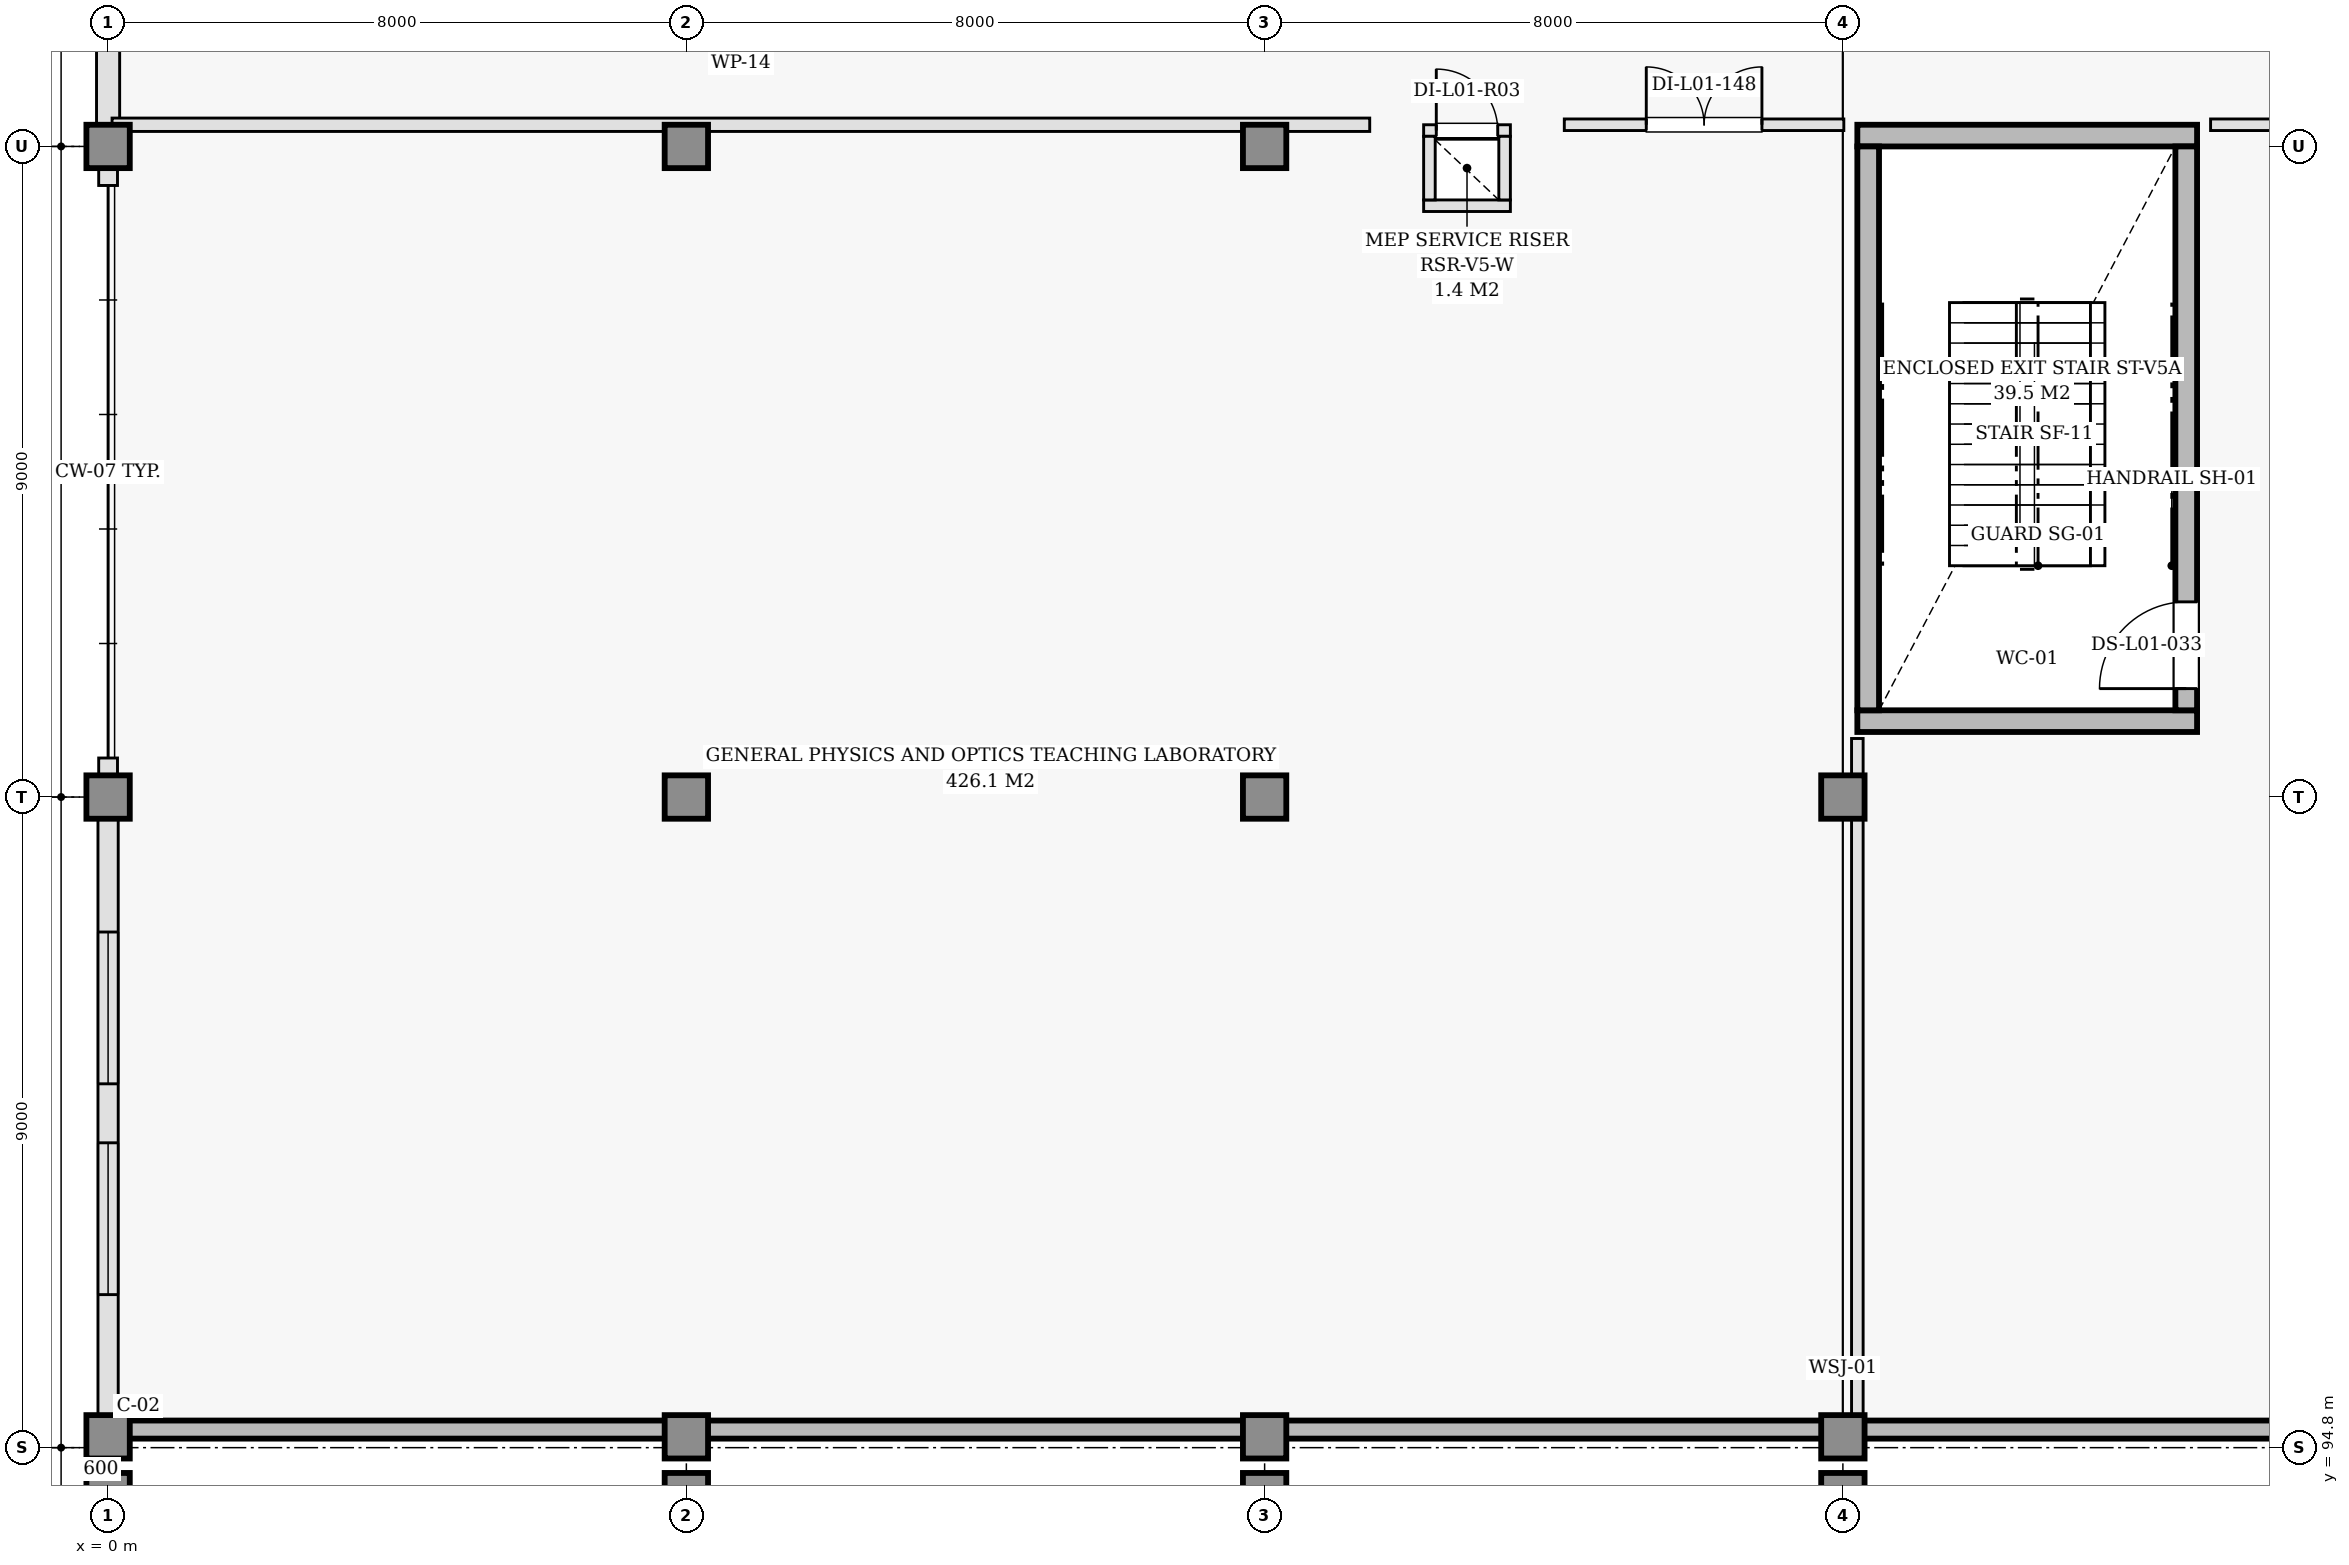
"""IFC4 building model, lengths in metres.
Left out: names, types, materials, properties, quantities, classifications, styles, units other than length and angle.
Written with IfcOpenShell. Run it as: python <this file> out.ifc"""

import sys

from ifc_helpers import new_model, si_unit, direction, frame, frame_2d, origin, origin_2d, place, context, subcontext, project, spatial, rectangle, extrude, element, fill, save


model = new_model("IFC4")
c1 = context("Model", 3, precision=1e-05, world=origin(), true_north=direction((0.0, 1.0)))
c2 = subcontext(c1, "Body", "Model", "MODEL_VIEW")
j1 = project(units=[si_unit("LENGTHUNIT", "METRE"), si_unit("PLANEANGLEUNIT", "RADIAN")], contexts=[c1])
p1 = place(None, origin())
s1 = spatial("IfcSite", under=j1, at=p1, CompositionType="ELEMENT")
p2 = place(p1, origin())
s2 = spatial("IfcBuilding", under=s1, at=p2, CompositionType="ELEMENT")
p3 = place(p2, frame((0.0, 0.0, 4.8)))
s3 = spatial("IfcBuildingStorey", under=s2, at=p3, CompositionType="ELEMENT", Elevation=4.8)
for number, where, z_axis, x_axis in (
    (1, (0.0, 94.95, 0.0), (0.0, 0.0, 1.0), (1.0, 0.0, 0.0)),
    (2, (0.0, 103.8, 0.0), (0.0, 0.0, 1.0), (1.0, 0.0, 0.0)),
    (3, (0.0, 112.8, 0.0), (0.0, 0.0, 1.0), (1.0, 0.0, 0.0)),
    (4, (8.0, 94.95, 0.0), (0.0, 0.0, 1.0), (1.0, 0.0, 0.0)),
    (5, (8.0, 103.8, 0.0), (0.0, 0.0, 1.0), (1.0, 0.0, 0.0)),
    (6, (8.0, 112.8, 0.0), (0.0, 0.0, 1.0), (1.0, 0.0, 0.0)),
    (7, (16.0, 94.95, 0.0), (0.0, 0.0, 1.0), (1.0, 0.0, 0.0)),
    (8, (16.0, 103.8, 0.0), (0.0, 0.0, 1.0), (1.0, 0.0, 0.0)),
    (9, (16.0, 112.8, 0.0), (0.0, 0.0, 1.0), (1.0, 0.0, 0.0)),
    (10, (24.0, 94.95, 0.0), (0.0, 0.0, 1.0), (1.0, 0.0, 0.0)),
    (11, (24.0, 103.8, 0.0), (0.0, 0.0, 1.0), (1.0, 0.0, 0.0)),
):
    element("IfcColumn", number, at=place(p3, frame(where, z_axis=z_axis, x_axis=x_axis)), inside=s3, PredefinedType="COLUMN", context=c2, shape_type="SweptSolid", body=[
        extrude(rectangle(XDim=0.6, YDim=0.6, at=origin_2d()), origin(), (0.0, 0.0, 1.0), 4.8),
    ])
for number, where, z_axis, x_axis in (
    (12, (0.0, 94.2, 0.0), (0.0, 0.0, 1.0), (1.0, 0.0, 0.0)),
    (13, (8.0, 94.2, 0.0), (0.0, 0.0, 1.0), (1.0, 0.0, 0.0)),
    (14, (16.0, 94.2, 0.0), (0.0, 0.0, 1.0), (1.0, 0.0, 0.0)),
    (15, (24.0, 94.2, 0.0), (0.0, 0.0, 1.0), (1.0, 0.0, 0.0)),
):
    element("IfcColumn", number, at=place(p3, frame(where, z_axis=z_axis, x_axis=x_axis)), inside=s3, PredefinedType="COLUMN", context=c2, shape_type="SweptSolid", body=[
        extrude(rectangle(XDim=0.5, YDim=0.5, at=origin_2d()), origin(), (0.0, 0.0, 1.0), 4.8),
    ])
p4 = place(p3, frame((0.0, 95.05, 0.0), z_axis=(0.0, 0.0, 1.0), x_axis=(1.0, 0.0, 0.0)))
e16 = element("IfcWall", 16, at=p4, inside=s3, PredefinedType="SHEAR", context=c2, shape_type="SweptSolid", body=[
    extrude(rectangle(XDim=48.0, YDim=0.25, at=frame_2d((24.0, 0.0))), origin(), (0.0, 0.0, 1.0), 4.48),
])
p5 = place(p3, frame((0.0, 121.8, 0.0), z_axis=(0.0, 0.0, 1.0), x_axis=(0.0, -1.0, 0.0)))
e17 = element("IfcWall", 17, at=p5, inside=s3, PredefinedType="SOLIDWALL", context=c2, shape_type="SweptSolid", body=[
    extrude(rectangle(XDim=9.0, YDim=0.32, at=frame_2d((4.5, 0.0))), origin(), (0.0, 0.0, 1.0), 3.715),
])
p6 = place(p5, frame((1.875, 0.0, 0.95)))
e18 = element("IfcOpeningElement", 18, at=p6, cuts=e17, PredefinedType="OPENING", context=c2, shape_type="SweptSolid", body=[
    extrude(rectangle(XDim=2.25, YDim=1.8, at=frame_2d((1.125, 0.9))), frame((0.0, 0.17, 0.0), z_axis=(0.0, -1.0, 0.0), x_axis=(1.0, 0.0, 0.0)), (0.0, 0.0, 1.0), 0.34),
])
for number, where, z_axis, x_axis in (
    (19, (0.0, 112.8, 0.0), (0.0, 0.0, 1.0), (0.0, -1.0, 0.0)),
    (20, (0.0, 104.34, 0.0), (0.0, 0.0, 1.0), (0.0, -1.0, 0.0)),
):
    element("IfcWall", number, at=place(p3, frame(where, z_axis=z_axis, x_axis=x_axis)), inside=s3, PredefinedType="SOLIDWALL", context=c2, shape_type="SweptSolid", body=[
        extrude(rectangle(XDim=0.54, YDim=0.26, at=frame_2d((0.27, 0.0))), origin(), (0.0, 0.0, 1.0), 3.715),
    ])
p7 = place(p3, frame((0.0, 103.8, 0.0), z_axis=(0.0, 0.0, 1.0), x_axis=(0.0, -1.0, 0.0)))
e21 = element("IfcWall", 21, at=p7, inside=s3, PredefinedType="SOLIDWALL", context=c2, shape_type="SweptSolid", body=[
    extrude(rectangle(XDim=8.75, YDim=0.28, at=frame_2d((4.375, 0.0))), origin(), (0.0, 0.0, 1.0), 3.715),
])
p8 = place(p7, frame((1.867, 0.0, 0.95)))
e22 = element("IfcOpeningElement", 22, at=p8, cuts=e21, PredefinedType="OPENING", context=c2, shape_type="SweptSolid", body=[
    extrude(rectangle(XDim=2.1, YDim=1.8, at=frame_2d((1.05, 0.9))), frame((0.0, 0.15, 0.0), z_axis=(0.0, -1.0, 0.0), x_axis=(1.0, 0.0, 0.0)), (0.0, 0.0, 1.0), 0.3),
])
p9 = place(p7, frame((4.783, 0.0, 0.95)))
e23 = element("IfcOpeningElement", 23, at=p9, cuts=e21, PredefinedType="OPENING", context=c2, shape_type="SweptSolid", body=[
    extrude(rectangle(XDim=2.1, YDim=1.8, at=frame_2d((1.05, 0.9))), frame((0.0, 0.15, 0.0), z_axis=(0.0, -1.0, 0.0), x_axis=(1.0, 0.0, 0.0)), (0.0, 0.0, 1.0), 0.3),
])
for number, where, z_axis, x_axis in (
    (24, (24.2, 104.85, 0.0), (0.0, 0.0, 1.0), (1.0, 0.0, 0.0)),
    (25, (24.2, 112.95, 0.0), (0.0, 0.0, 1.0), (1.0, 0.0, 0.0)),
):
    element("IfcWall", number, at=place(p3, frame(where, z_axis=z_axis, x_axis=x_axis)), inside=s3, PredefinedType="SHEAR", context=c2, shape_type="SweptSolid", body=[
        extrude(rectangle(XDim=4.7, YDim=0.3, at=frame_2d((2.35, 0.0))), origin(), (0.0, 0.0, 1.0), 4.48),
    ])
p10 = place(p3, frame((24.35, 105.0, 0.0), z_axis=(0.0, 0.0, 1.0), x_axis=(0.0, 1.0, 0.0)))
e26 = element("IfcWall", 26, at=p10, inside=s3, PredefinedType="SHEAR", context=c2, shape_type="SweptSolid", body=[
    extrude(rectangle(XDim=7.8, YDim=0.3, at=frame_2d((3.9, 0.0))), origin(), (0.0, 0.0, 1.0), 4.48),
])
p11 = place(p3, frame((28.75, 105.0, 0.0), z_axis=(0.0, 0.0, 1.0), x_axis=(0.0, 1.0, 0.0)))
e27 = element("IfcWall", 27, at=p11, inside=s3, PredefinedType="SHEAR", context=c2, shape_type="SweptSolid", body=[
    extrude(rectangle(XDim=7.8, YDim=0.3, at=frame_2d((3.9, 0.0))), origin(), (0.0, 0.0, 1.0), 4.48),
])
p12 = place(p11, frame((0.3, 0.0, 0.0)))
e28 = element("IfcOpeningElement", 28, at=p12, cuts=e27, PredefinedType="OPENING", context=c2, shape_type="SweptSolid", body=[
    extrude(rectangle(XDim=1.2, YDim=2.15, at=frame_2d((0.6, 1.075))), frame((0.0, 0.16, 0.0), z_axis=(0.0, -1.0, 0.0), x_axis=(1.0, 0.0, 0.0)), (0.0, 0.0, 1.0), 0.32),
])
p13 = place(p3, frame((18.2, 111.98, 0.0), z_axis=(0.0, 0.0, 1.0), x_axis=(1.0, 0.0, 0.0)))
e29 = element("IfcWall", 29, at=p13, inside=s3, PredefinedType="PARTITIONING", context=c2, shape_type="SweptSolid", body=[
    extrude(rectangle(XDim=1.2, YDim=0.16, at=frame_2d((0.6, 0.0))), origin(), (0.0, 0.0, 1.0), 4.48),
])
p14 = place(p3, frame((18.2, 113.02, 0.0), z_axis=(0.0, 0.0, 1.0), x_axis=(1.0, 0.0, 0.0)))
e30 = element("IfcWall", 30, at=p14, inside=s3, PredefinedType="PARTITIONING", context=c2, shape_type="SweptSolid", body=[
    extrude(rectangle(XDim=1.2, YDim=0.16, at=frame_2d((0.6, 0.0))), origin(), (0.0, 0.0, 1.0), 4.48),
])
p15 = place(p14, frame((0.175, 0.0, 0.0)))
e31 = element("IfcOpeningElement", 31, at=p15, cuts=e30, PredefinedType="OPENING", context=c2, shape_type="SweptSolid", body=[
    extrude(rectangle(XDim=0.85, YDim=2.02, at=frame_2d((0.425, 1.01))), frame((0.0, 0.09, 0.0), z_axis=(0.0, -1.0, 0.0), x_axis=(1.0, 0.0, 0.0)), (0.0, 0.0, 1.0), 0.18),
])
for number, where, z_axis, x_axis in (
    (32, (18.28, 112.06, 0.0), (0.0, 0.0, 1.0), (0.0, 1.0, 0.0)),
    (33, (19.32, 112.06, 0.0), (0.0, 0.0, 1.0), (0.0, 1.0, 0.0)),
):
    element("IfcWall", number, at=place(p3, frame(where, z_axis=z_axis, x_axis=x_axis)), inside=s3, PredefinedType="PARTITIONING", context=c2, shape_type="SweptSolid", body=[
        extrude(rectangle(XDim=0.88, YDim=0.16, at=frame_2d((0.44, 0.0))), origin(), (0.0, 0.0, 1.0), 4.48),
    ])
p16 = place(p3, frame((20.146, 113.1, 0.0), z_axis=(0.0, 0.0, 1.0), x_axis=(1.0, 0.0, 0.0)))
e34 = element("IfcWall", 34, at=p16, inside=s3, PredefinedType="PARTITIONING", context=c2, shape_type="SweptSolid", body=[
    extrude(rectangle(XDim=3.867, YDim=0.16, at=frame_2d((1.934, 0.0))), origin(), (0.0, 0.0, 1.0), 4.48),
])
p17 = place(p16, frame((1.134, 0.0, 0.0)))
e35 = element("IfcOpeningElement", 35, at=p17, cuts=e34, PredefinedType="OPENING", context=c2, shape_type="SweptSolid", body=[
    extrude(rectangle(XDim=1.6, YDim=2.2, at=frame_2d((0.8, 1.1))), frame((0.0, 0.09, 0.0), z_axis=(0.0, -1.0, 0.0), x_axis=(1.0, 0.0, 0.0)), (0.0, 0.0, 1.0), 0.18),
])
p18 = place(p3, frame((0.055, 113.1, 0.0), z_axis=(0.0, 0.0, 1.0), x_axis=(1.0, 0.0, 0.0)))
e36 = element("IfcWall", 36, at=p18, inside=s3, PredefinedType="PARTITIONING", context=c2, shape_type="SweptSolid", body=[
    extrude(rectangle(XDim=17.399, YDim=0.185, at=frame_2d((8.7, 0.0))), origin(), (0.0, 0.0, 1.0), 3.715),
])
p19 = place(p3, frame((24.2, 95.105, 0.0), z_axis=(0.0, 0.0, 1.0), x_axis=(0.0, 1.0, 0.0)))
e37 = element("IfcWall", 37, at=p19, inside=s3, PredefinedType="PARTITIONING", context=c2, shape_type="SweptSolid", body=[
    extrude(rectangle(XDim=9.505, YDim=0.16, at=frame_2d((4.752, 0.0))), origin(), (0.0, 0.0, 1.0), 3.715),
])
p20 = place(p3, frame((29.087, 113.1, 0.0), z_axis=(0.0, 0.0, 1.0), x_axis=(1.0, 0.0, 0.0)))
e38 = element("IfcWall", 38, at=p20, inside=s3, PredefinedType="PARTITIONING", context=c2, shape_type="SweptSolid", body=[
    extrude(rectangle(XDim=2.873, YDim=0.16, at=frame_2d((1.437, 0.0))), origin(), (0.0, 0.0, 1.0), 3.815),
])
p21 = place(p8, origin())
e39 = element("IfcWindow", 39, at=p21, inside=s3, PartitioningType="DOUBLE_PANEL_VERTICAL", PredefinedType="WINDOW", context=c2, shape_type="SweptSolid", body=[
    extrude(rectangle(XDim=2.1, YDim=1.8, at=frame_2d((1.05, 0.9))), frame((0.0, 0.03, 0.0), z_axis=(0.0, -1.0, 0.0), x_axis=(1.0, 0.0, 0.0)), (0.0, 0.0, 1.0), 0.06),
])
fill(e22, e39)
p22 = place(p9, origin())
e40 = element("IfcWindow", 40, at=p22, inside=s3, PartitioningType="DOUBLE_PANEL_VERTICAL", PredefinedType="WINDOW", context=c2, shape_type="SweptSolid", body=[
    extrude(rectangle(XDim=2.1, YDim=1.8, at=frame_2d((1.05, 0.9))), frame((0.0, 0.03, 0.0), z_axis=(0.0, -1.0, 0.0), x_axis=(1.0, 0.0, 0.0)), (0.0, 0.0, 1.0), 0.06),
])
fill(e23, e40)
p23 = place(p12, origin())
e41 = element("IfcDoor", 41, at=p23, inside=s3, OperationType="SINGLE_SWING_LEFT", PredefinedType="DOOR", context=c2, shape_type="SweptSolid", body=[
    extrude(rectangle(XDim=1.2, YDim=2.15, at=frame_2d((0.6, 1.075))), frame((0.0, 0.025, 0.0), z_axis=(0.0, -1.0, 0.0), x_axis=(1.0, 0.0, 0.0)), (0.0, 0.0, 1.0), 0.05),
])
fill(e28, e41)
p24 = place(p15, origin())
e42 = element("IfcDoor", 42, at=p24, inside=s3, OperationType="SINGLE_SWING_LEFT", PredefinedType="DOOR", context=c2, shape_type="SweptSolid", body=[
    extrude(rectangle(XDim=0.85, YDim=2.02, at=frame_2d((0.425, 1.01))), frame((0.0, 0.025, 0.0), z_axis=(0.0, -1.0, 0.0), x_axis=(1.0, 0.0, 0.0)), (0.0, 0.0, 1.0), 0.05),
])
fill(e31, e42)
p25 = place(p17, origin())
e43 = element("IfcDoor", 43, at=p25, inside=s3, OperationType="DOUBLE_DOOR_SINGLE_SWING", PredefinedType="DOOR", context=c2, shape_type="SweptSolid", body=[
    extrude(rectangle(XDim=1.6, YDim=2.2, at=frame_2d((0.8, 1.1))), frame((0.0, 0.025, 0.0), z_axis=(0.0, -1.0, 0.0), x_axis=(1.0, 0.0, 0.0)), (0.0, 0.0, 1.0), 0.05),
])
fill(e35, e43)
save(model, sys.argv[1])
